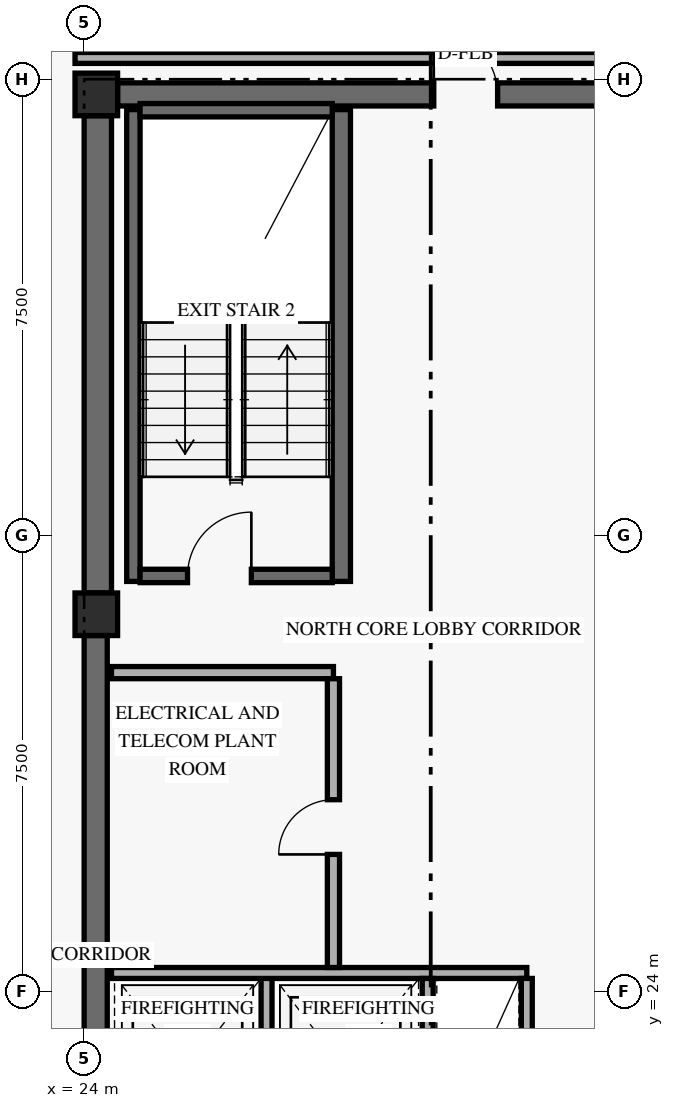
"""IFC4 building model, lengths in metres.
Left out: names, types, materials, properties, quantities, classifications, styles, units other than length and angle.
Written with IfcOpenShell. Run it as: python <this file> out.ifc"""

import sys

from ifc_helpers import new_model, si_unit, direction, frame, frame_2d, origin, origin_2d, place, context, subcontext, project, spatial, rectangle, extrude, element, fill, save


model = new_model("IFC4")
c1 = context("Model", 3, precision=1e-05, world=origin(), true_north=direction((0.0, 1.0)))
c2 = subcontext(c1, "Body", "Model", "MODEL_VIEW")
j1 = project(units=[si_unit("LENGTHUNIT", "METRE"), si_unit("PLANEANGLEUNIT", "RADIAN")], contexts=[c1])
p1 = place(None, origin())
s1 = spatial("IfcSite", under=j1, at=p1, CompositionType="ELEMENT")
p2 = place(p1, origin())
s2 = spatial("IfcBuilding", under=s1, at=p2, CompositionType="ELEMENT")
p3 = place(p2, frame((0.0, 0.0, 155.4)))
s3 = spatial("IfcBuildingStorey", under=s2, at=p3, CompositionType="ELEMENT", Elevation=155.4)
p4 = place(p3, frame((24.19, 17.9, 0.0), z_axis=(0.0, 0.0, 1.0), x_axis=(0.0, 1.0, 0.0)))
e1 = element("IfcWall", 1, at=p4, inside=s3, PredefinedType="SHEAR", context=c2, shape_type="SweptSolid", body=[
    extrude(rectangle(XDim=11.95, YDim=0.38, at=frame_2d((5.975, 0.0))), origin(), (0.0, 0.0, 1.0), 2.748),
])
p5 = place(p3, frame((24.225, 30.55, 0.0), z_axis=(0.0, 0.0, 1.0), x_axis=(0.0, 1.0, 0.0)))
e2 = element("IfcWall", 2, at=p5, inside=s3, PredefinedType="SHEAR", context=c2, shape_type="SweptSolid", body=[
    extrude(rectangle(XDim=7.85, YDim=0.45, at=frame_2d((3.925, 0.0))), origin(), (0.0, 0.0, 1.0), 2.748),
])
p6 = place(p3, frame((24.55, 38.75, 0.0), z_axis=(0.0, 0.0, 1.0), x_axis=(1.0, 0.0, 0.0)))
e3 = element("IfcWall", 3, at=p6, inside=s3, PredefinedType="SHEAR", context=c2, shape_type="SweptSolid", body=[
    extrude(rectangle(XDim=10.3, YDim=0.38, at=frame_2d((5.15, 0.0))), origin(), (0.0, 0.0, 1.0), 3.36),
])
p7 = place(p6, frame((5.2, 0.0, 0.0)))
e4 = element("IfcOpeningElement", 4, at=p7, cuts=e3, PredefinedType="OPENING", context=c2, shape_type="SweptSolid", body=[
    extrude(rectangle(XDim=1.05, YDim=2.15, at=frame_2d((0.525, 1.075))), frame((0.0, 0.2, 0.0), z_axis=(0.0, -1.0, 0.0), x_axis=(1.0, 0.0, 0.0)), (0.0, 0.0, 1.0), 0.4),
])
p8 = place(p3, frame((24.81, 30.74, 0.0), z_axis=(0.0, 0.0, 1.0), x_axis=(0.0, 1.0, 0.0)))
e5 = element("IfcWall", 5, at=p8, inside=s3, PredefinedType="SHEAR", context=c2, shape_type="SweptSolid", body=[
    extrude(rectangle(XDim=7.76, YDim=0.22, at=frame_2d((3.88, 0.0))), origin(), (0.0, 0.0, 1.0), 3.36),
])
p9 = place(p3, frame((28.23, 30.74, 0.0), z_axis=(0.0, 0.0, 1.0), x_axis=(0.0, 1.0, 0.0)))
e6 = element("IfcWall", 6, at=p9, inside=s3, PredefinedType="SHEAR", context=c2, shape_type="SweptSolid", body=[
    extrude(rectangle(XDim=7.76, YDim=0.3, at=frame_2d((3.88, 0.0))), origin(), (0.0, 0.0, 1.0), 3.36),
])
p10 = place(p3, frame((24.92, 30.83, 0.0), z_axis=(0.0, 0.0, 1.0), x_axis=(1.0, 0.0, 0.0)))
e7 = element("IfcWall", 7, at=p10, inside=s3, PredefinedType="SHEAR", context=c2, shape_type="SweptSolid", body=[
    extrude(rectangle(XDim=3.16, YDim=0.22, at=frame_2d((1.58, 0.0))), origin(), (0.0, 0.0, 1.0), 3.36),
])
p11 = place(p10, frame((0.78, 0.0, 0.0)))
e8 = element("IfcOpeningElement", 8, at=p11, cuts=e7, PredefinedType="OPENING", context=c2, shape_type="SweptSolid", body=[
    extrude(rectangle(XDim=1.05, YDim=2.15, at=frame_2d((0.525, 1.075))), frame((0.0, 0.12, 0.0), z_axis=(0.0, -1.0, 0.0), x_axis=(1.0, 0.0, 0.0)), (0.0, 0.0, 1.0), 0.24),
])
p12 = place(p3, frame((24.92, 38.49, 0.0), z_axis=(0.0, 0.0, 1.0), x_axis=(1.0, 0.0, 0.0)))
e9 = element("IfcWall", 9, at=p12, inside=s3, PredefinedType="SHEAR", context=c2, shape_type="SweptSolid", body=[
    extrude(rectangle(XDim=3.16, YDim=0.22, at=frame_2d((1.58, 0.0))), origin(), (0.0, 0.0, 1.0), 3.36),
])
for number, where, z_axis, x_axis in (
    (10, (24.2, 30.2, 0.0), (0.0, 0.0, 1.0), (1.0, 0.0, 0.0)),
    (11, (24.2, 38.75, 0.0), (0.0, 0.0, 1.0), (1.0, 0.0, 0.0)),
):
    element("IfcColumn", number, at=place(p3, frame(where, z_axis=z_axis, x_axis=x_axis)), inside=s3, PredefinedType="COLUMN", context=c2, shape_type="SweptSolid", body=[
        extrude(rectangle(XDim=0.7, YDim=0.7, at=origin_2d()), origin(), (0.0, 0.0, 1.0), 3.6),
    ])
p13 = place(p3, frame((27.0, 21.19, 0.0), z_axis=(0.0, 0.0, 1.0), x_axis=(0.0, 1.0, 0.0)))
e12 = element("IfcWall", 12, at=p13, inside=s3, PredefinedType="STANDARD", context=c2, shape_type="SweptSolid", body=[
    extrude(rectangle(XDim=3.11, YDim=0.18, at=frame_2d((1.555, 0.0))), origin(), (0.0, 0.0, 1.0), 3.36),
])
p14 = place(p3, frame((24.45, 24.3, 0.0), z_axis=(0.0, 0.0, 1.0), x_axis=(1.0, 0.0, 0.0)))
e13 = element("IfcWall", 13, at=p14, inside=s3, PredefinedType="STANDARD", context=c2, shape_type="SweptSolid", body=[
    extrude(rectangle(XDim=6.83, YDim=0.18, at=frame_2d((3.415, 0.0))), origin(), (0.0, 0.0, 1.0), 3.36),
])
for number, where, z_axis, x_axis in (
    (14, (29.65, 21.19, 0.0), (0.0, 0.0, 1.0), (0.0, 1.0, 0.0)),
    (15, (31.28, 21.19, 0.0), (0.0, 0.0, 1.0), (0.0, 1.0, 0.0)),
):
    element("IfcWall", number, at=place(p3, frame(where, z_axis=z_axis, x_axis=x_axis)), inside=s3, PredefinedType="STANDARD", context=c2, shape_type="SweptSolid", body=[
        extrude(rectangle(XDim=3.02, YDim=0.18, at=frame_2d((1.51, 0.0))), origin(), (0.0, 0.0, 1.0), 3.36),
    ])
p15 = place(p3, frame((24.45, 29.24, 0.0), z_axis=(0.0, 0.0, 1.0), x_axis=(1.0, 0.0, 0.0)))
e16 = element("IfcWall", 16, at=p15, inside=s3, PredefinedType="STANDARD", context=c2, shape_type="SweptSolid", body=[
    extrude(rectangle(XDim=3.65, YDim=0.2, at=frame_2d((1.825, 0.0))), origin(), (0.0, 0.0, 1.0), 3.36),
])
p16 = place(p3, frame((28.1, 24.39, 0.0), z_axis=(0.0, 0.0, 1.0), x_axis=(0.0, 1.0, 0.0)))
e17 = element("IfcWall", 17, at=p16, inside=s3, PredefinedType="STANDARD", context=c2, shape_type="SweptSolid", body=[
    extrude(rectangle(XDim=4.75, YDim=0.2, at=frame_2d((2.375, 0.0))), origin(), (0.0, 0.0, 1.0), 3.36),
])
p17 = place(p16, frame((1.86, 0.0, 0.0)))
e18 = element("IfcOpeningElement", 18, at=p17, cuts=e17, PredefinedType="OPENING", context=c2, shape_type="SweptSolid", body=[
    extrude(rectangle(XDim=0.9, YDim=2.1, at=frame_2d((0.45, 1.05))), frame((0.0, 0.11, 0.0), z_axis=(0.0, -1.0, 0.0), x_axis=(1.0, 0.0, 0.0)), (0.0, 0.0, 1.0), 0.22),
])
p18 = place(p3, frame((23.85, 39.35, 0.0), z_axis=(0.0, 0.0, 1.0), x_axis=(1.0, 0.0, 0.0)))
e19 = element("IfcWall", 19, at=p18, inside=s3, PredefinedType="STANDARD", context=c2, shape_type="SweptSolid", body=[
    extrude(rectangle(XDim=11.57, YDim=0.18, at=frame_2d((5.785, 0.0))), origin(), (0.0, 0.0, 1.0), 2.73),
])
p19 = place(p11, origin())
e20 = element("IfcDoor", 20, at=p19, inside=s3, OperationType="SINGLE_SWING_RIGHT", PredefinedType="DOOR", context=c2, shape_type="SweptSolid", body=[
    extrude(rectangle(XDim=1.05, YDim=2.15, at=frame_2d((0.525, 1.075))), frame((0.0, 0.025, 0.0), z_axis=(0.0, -1.0, 0.0), x_axis=(1.0, 0.0, 0.0)), (0.0, 0.0, 1.0), 0.05),
])
fill(e8, e20)
p20 = place(p17, origin())
e21 = element("IfcDoor", 21, at=p20, inside=s3, OperationType="SINGLE_SWING_LEFT", PredefinedType="DOOR", context=c2, shape_type="SweptSolid", body=[
    extrude(rectangle(XDim=0.9, YDim=2.1, at=frame_2d((0.45, 1.05))), frame((0.0, 0.025, 0.0), z_axis=(0.0, -1.0, 0.0), x_axis=(1.0, 0.0, 0.0)), (0.0, 0.0, 1.0), 0.05),
])
fill(e18, e21)
p21 = place(p7, frame((1.05, 0.0, 0.0), z_axis=(0.0, 0.0, 1.0), x_axis=(-1.0, 0.0, 0.0)))
e22 = element("IfcDoor", 22, at=p21, inside=s3, OperationType="SINGLE_SWING_RIGHT", PredefinedType="DOOR", context=c2, shape_type="SweptSolid", body=[
    extrude(rectangle(XDim=1.05, YDim=2.15, at=frame_2d((0.525, 1.075))), frame((0.0, 0.025, 0.0), z_axis=(0.0, -1.0, 0.0), x_axis=(1.0, 0.0, 0.0)), (0.0, 0.0, 1.0), 0.05),
])
fill(e4, e22)
save(model, sys.argv[1])
